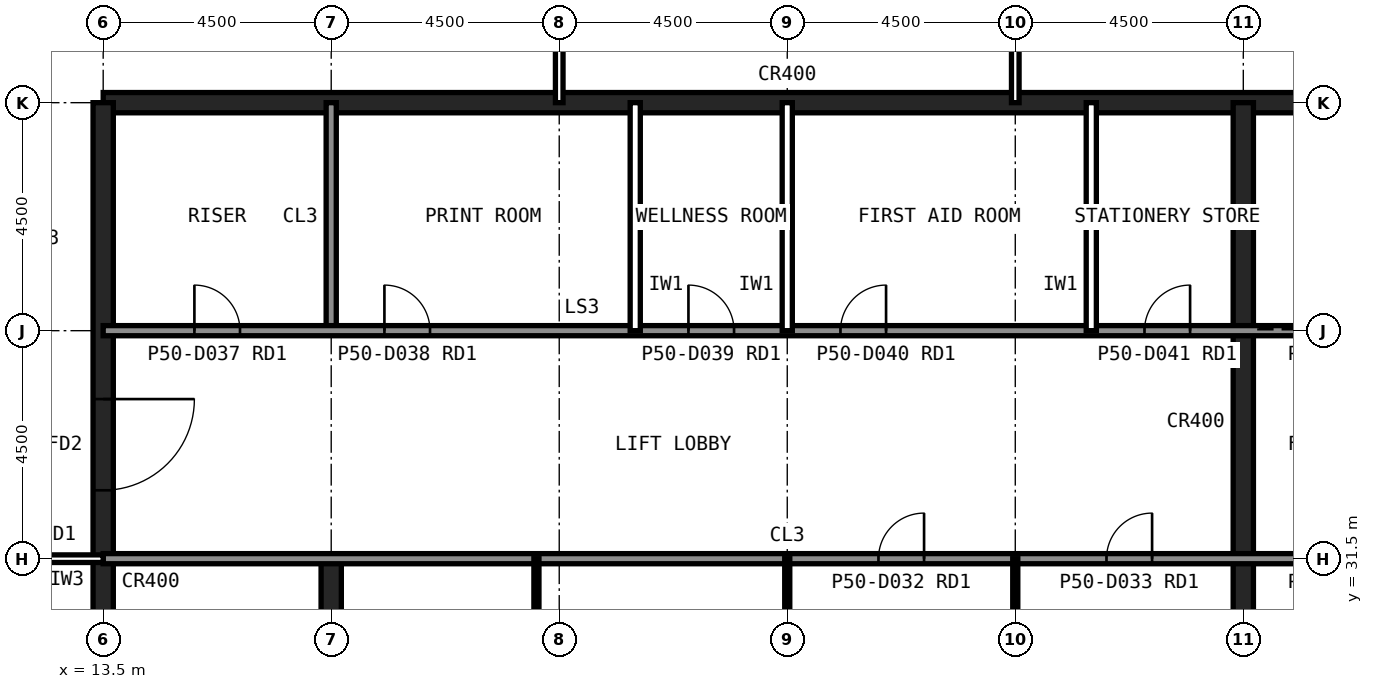
"""IFC4 building model, lengths in metres.
Left out: names, types, materials, properties, quantities, classifications, styles, units other than length and angle.
Written with IfcOpenShell. Run it as: python <this file> out.ifc"""

import sys

from ifc_helpers import new_model, si_unit, direction, frame, frame_2d, origin, place, context, subcontext, project, spatial, rectangle, extrude, element, fill, save


model = new_model("IFC4")
c1 = context("Model", 3, precision=1e-05, world=origin(), true_north=direction((0.0, 1.0)))
c2 = subcontext(c1, "Body", "Model", "MODEL_VIEW")
j1 = project(units=[si_unit("LENGTHUNIT", "METRE"), si_unit("PLANEANGLEUNIT", "RADIAN")], contexts=[c1])
p1 = place(None, origin())
s1 = spatial("IfcSite", under=j1, at=p1, CompositionType="ELEMENT")
p2 = place(p1, origin())
s2 = spatial("IfcBuilding", under=s1, at=p2, CompositionType="ELEMENT")
p3 = place(p2, frame((0.0, 0.0, 214.6)))
s3 = spatial("IfcBuildingStorey", under=s2, at=p3, CompositionType="ELEMENT", Elevation=214.6)
p4 = place(p3, frame((40.5, 40.5, 0.0), z_axis=(0.0, 0.0, 1.0), x_axis=(-1.0, 0.0, 0.0)))
e1 = element("IfcWall", 1, at=p4, inside=s3, PredefinedType="SHEAR", context=c2, shape_type="SweptSolid", body=[
    extrude(rectangle(XDim=27.0, YDim=0.4, at=frame_2d((13.5, 0.0))), origin(), (0.0, 0.0, 1.0), 4.0),
])
p5 = place(p3, frame((13.5, 40.5, 0.0), z_axis=(0.0, 0.0, 1.0), x_axis=(0.0, -1.0, 0.0)))
e2 = element("IfcWall", 2, at=p5, inside=s3, PredefinedType="SHEAR", context=c2, shape_type="SweptSolid", body=[
    extrude(rectangle(XDim=27.0, YDim=0.4, at=frame_2d((13.5, 0.0))), origin(), (0.0, 0.0, 1.0), 4.0),
])
p6 = place(p5, frame((19.65, 0.0, 0.0)))
e3 = element("IfcOpeningElement", 3, at=p6, cuts=e2, PredefinedType="OPENING", context=c2, shape_type="SweptSolid", body=[
    extrude(rectangle(XDim=1.2, YDim=2.1, at=frame_2d((0.6, 1.05))), frame((0.0, 0.21, 0.0), z_axis=(0.0, -1.0, 0.0), x_axis=(1.0, 0.0, 0.0)), (0.0, 0.0, 1.0), 0.42),
])
p7 = place(p5, frame((5.85, 0.0, 0.0)))
e4 = element("IfcOpeningElement", 4, at=p7, cuts=e2, PredefinedType="OPENING", context=c2, shape_type="SweptSolid", body=[
    extrude(rectangle(XDim=1.8, YDim=2.1, at=frame_2d((0.9, 1.05))), frame((0.0, 0.21, 0.0), z_axis=(0.0, -1.0, 0.0), x_axis=(1.0, 0.0, 0.0)), (0.0, 0.0, 1.0), 0.42),
])
p8 = place(p3, frame((18.0, 13.5, 0.0), z_axis=(0.0, 0.0, 1.0), x_axis=(0.0, 1.0, 0.0)))
e5 = element("IfcWall", 5, at=p8, inside=s3, PredefinedType="SHEAR", context=c2, shape_type="SweptSolid", body=[
    extrude(rectangle(XDim=18.0, YDim=0.4, at=frame_2d((9.0, 0.0))), origin(), (0.0, 0.0, 1.0), 4.0),
])
p9 = place(p3, frame((18.0, 36.0, 0.0), z_axis=(0.0, 0.0, 1.0), x_axis=(0.0, 1.0, 0.0)))
e6 = element("IfcWall", 6, at=p9, inside=s3, PredefinedType="SOLIDWALL", context=c2, shape_type="SweptSolid", body=[
    extrude(rectangle(XDim=4.5, YDim=0.2, at=frame_2d((2.25, 0.0))), origin(), (0.0, 0.0, 1.0), 3.84),
])
p10 = place(p3, frame((36.0, 22.5, 0.0), z_axis=(0.0, 0.0, 1.0), x_axis=(0.0, 1.0, 0.0)))
e7 = element("IfcWall", 7, at=p10, inside=s3, PredefinedType="SHEAR", context=c2, shape_type="SweptSolid", body=[
    extrude(rectangle(XDim=18.0, YDim=0.4, at=frame_2d((9.0, 0.0))), origin(), (0.0, 0.0, 1.0), 4.0),
])
p11 = place(p3, frame((13.5, 36.0, 0.0), z_axis=(0.0, 0.0, 1.0), x_axis=(1.0, 0.0, 0.0)))
e8 = element("IfcWall", 8, at=p11, inside=s3, PredefinedType="SOLIDWALL", context=c2, shape_type="SweptSolid", body=[
    extrude(rectangle(XDim=27.0, YDim=0.2, at=frame_2d((13.5, 0.0))), origin(), (0.0, 0.0, 1.0), 3.84),
])
p12 = place(p11, frame((1.8, 0.0, 0.0)))
e9 = element("IfcOpeningElement", 9, at=p12, cuts=e8, PredefinedType="OPENING", context=c2, shape_type="SweptSolid", body=[
    extrude(rectangle(XDim=0.9, YDim=2.1, at=frame_2d((0.45, 1.05))), frame((0.0, 0.11, 0.0), z_axis=(0.0, -1.0, 0.0), x_axis=(1.0, 0.0, 0.0)), (0.0, 0.0, 1.0), 0.22),
])
p13 = place(p11, frame((5.55, 0.0, 0.0)))
e10 = element("IfcOpeningElement", 10, at=p13, cuts=e8, PredefinedType="OPENING", context=c2, shape_type="SweptSolid", body=[
    extrude(rectangle(XDim=0.9, YDim=2.1, at=frame_2d((0.45, 1.05))), frame((0.0, 0.11, 0.0), z_axis=(0.0, -1.0, 0.0), x_axis=(1.0, 0.0, 0.0)), (0.0, 0.0, 1.0), 0.22),
])
p14 = place(p11, frame((11.55, 0.0, 0.0)))
e11 = element("IfcOpeningElement", 11, at=p14, cuts=e8, PredefinedType="OPENING", context=c2, shape_type="SweptSolid", body=[
    extrude(rectangle(XDim=0.9, YDim=2.1, at=frame_2d((0.45, 1.05))), frame((0.0, 0.11, 0.0), z_axis=(0.0, -1.0, 0.0), x_axis=(1.0, 0.0, 0.0)), (0.0, 0.0, 1.0), 0.22),
])
p15 = place(p11, frame((14.55, 0.0, 0.0)))
e12 = element("IfcOpeningElement", 12, at=p15, cuts=e8, PredefinedType="OPENING", context=c2, shape_type="SweptSolid", body=[
    extrude(rectangle(XDim=0.9, YDim=2.1, at=frame_2d((0.45, 1.05))), frame((0.0, 0.11, 0.0), z_axis=(0.0, -1.0, 0.0), x_axis=(1.0, 0.0, 0.0)), (0.0, 0.0, 1.0), 0.22),
])
p16 = place(p11, frame((20.55, 0.0, 0.0)))
e13 = element("IfcOpeningElement", 13, at=p16, cuts=e8, PredefinedType="OPENING", context=c2, shape_type="SweptSolid", body=[
    extrude(rectangle(XDim=0.9, YDim=2.1, at=frame_2d((0.45, 1.05))), frame((0.0, 0.11, 0.0), z_axis=(0.0, -1.0, 0.0), x_axis=(1.0, 0.0, 0.0)), (0.0, 0.0, 1.0), 0.22),
])
p17 = place(p11, frame((24.1, 0.0, 0.0)))
e14 = element("IfcOpeningElement", 14, at=p17, cuts=e8, PredefinedType="OPENING", context=c2, shape_type="SweptSolid", body=[
    extrude(rectangle(XDim=1.3, YDim=2.2, at=frame_2d((0.65, 1.1))), frame((0.0, 0.11, 0.0), z_axis=(0.0, -1.0, 0.0), x_axis=(1.0, 0.0, 0.0)), (0.0, 0.0, 1.0), 0.22),
])
p18 = place(p3, frame((13.5, 31.5, 0.0), z_axis=(0.0, 0.0, 1.0), x_axis=(1.0, 0.0, 0.0)))
e15 = element("IfcWall", 15, at=p18, inside=s3, PredefinedType="SOLIDWALL", context=c2, shape_type="SweptSolid", body=[
    extrude(rectangle(XDim=27.0, YDim=0.2, at=frame_2d((13.5, 0.0))), origin(), (0.0, 0.0, 1.0), 3.84),
])
p19 = place(p18, frame((24.15, 0.0, 0.0)))
e16 = element("IfcOpeningElement", 16, at=p19, cuts=e15, PredefinedType="OPENING", context=c2, shape_type="SweptSolid", body=[
    extrude(rectangle(XDim=1.2, YDim=2.1, at=frame_2d((0.6, 1.05))), frame((0.0, 0.11, 0.0), z_axis=(0.0, -1.0, 0.0), x_axis=(1.0, 0.0, 0.0)), (0.0, 0.0, 1.0), 0.22),
])
p20 = place(p18, frame((15.3, 0.0, 0.0)))
e17 = element("IfcOpeningElement", 17, at=p20, cuts=e15, PredefinedType="OPENING", context=c2, shape_type="SweptSolid", body=[
    extrude(rectangle(XDim=0.9, YDim=2.1, at=frame_2d((0.45, 1.05))), frame((0.0, 0.11, 0.0), z_axis=(0.0, -1.0, 0.0), x_axis=(1.0, 0.0, 0.0)), (0.0, 0.0, 1.0), 0.22),
])
p21 = place(p18, frame((19.8, 0.0, 0.0)))
e18 = element("IfcOpeningElement", 18, at=p21, cuts=e15, PredefinedType="OPENING", context=c2, shape_type="SweptSolid", body=[
    extrude(rectangle(XDim=0.9, YDim=2.1, at=frame_2d((0.45, 1.05))), frame((0.0, 0.11, 0.0), z_axis=(0.0, -1.0, 0.0), x_axis=(1.0, 0.0, 0.0)), (0.0, 0.0, 1.0), 0.22),
])
for number, where, z_axis, x_axis in (
    (19, (24.0, 36.0, 0.0), (0.0, 0.0, 1.0), (0.0, 1.0, 0.0)),
    (20, (27.0, 36.0, 0.0), (0.0, 0.0, 1.0), (0.0, 1.0, 0.0)),
    (21, (33.0, 36.0, 0.0), (0.0, 0.0, 1.0), (0.0, 1.0, 0.0)),
):
    element("IfcWall", number, at=place(p3, frame(where, z_axis=z_axis, x_axis=x_axis)), inside=s3, PredefinedType="PARTITIONING", context=c2, shape_type="SweptSolid", body=[
        extrude(rectangle(XDim=4.5, YDim=0.2, at=frame_2d((2.25, 0.0))), origin(), (0.0, 0.0, 1.0), 3.84),
    ])
for number, where, z_axis, x_axis in (
    (22, (22.05, 22.5, 0.0), (0.0, 0.0, 1.0), (0.0, 1.0, 0.0)),
    (23, (27.0, 22.5, 0.0), (0.0, 0.0, 1.0), (0.0, 1.0, 0.0)),
    (24, (31.5, 22.5, 0.0), (0.0, 0.0, 1.0), (0.0, 1.0, 0.0)),
):
    element("IfcWall", number, at=place(p3, frame(where, z_axis=z_axis, x_axis=x_axis)), inside=s3, PredefinedType="PLUMBINGWALL", context=c2, shape_type="SweptSolid", body=[
        extrude(rectangle(XDim=9.0, YDim=0.1, at=frame_2d((4.5, 0.0))), origin(), (0.0, 0.0, 1.0), 3.84),
    ])
p22 = place(p3, frame((31.5, 40.5, 0.0), z_axis=(0.0, 0.0, 1.0), x_axis=(0.0, 1.0, 0.0)))
e25 = element("IfcWall", 25, at=p22, inside=s3, PredefinedType="PARTITIONING", context=c2, shape_type="SweptSolid", body=[
    extrude(rectangle(XDim=4.5, YDim=0.15, at=frame_2d((2.25, 0.0))), origin(), (0.0, 0.0, 1.0), 2.989),
])
p23 = place(p3, frame((22.5, 45.0, 0.0), z_axis=(0.0, 0.0, 1.0), x_axis=(0.0, -1.0, 0.0)))
e26 = element("IfcWall", 26, at=p23, inside=s3, PredefinedType="PARTITIONING", context=c2, shape_type="SweptSolid", body=[
    extrude(rectangle(XDim=4.5, YDim=0.15, at=frame_2d((2.25, 0.0))), origin(), (0.0, 0.0, 1.0), 2.989),
])
p24 = place(p23, frame((1.75, 0.0, 0.0)))
e27 = element("IfcOpeningElement", 27, at=p24, cuts=e26, PredefinedType="OPENING", context=c2, shape_type="SweptSolid", body=[
    extrude(rectangle(XDim=1.0, YDim=2.1, at=frame_2d((0.5, 1.05))), frame((0.0, 0.085, 0.0), z_axis=(0.0, -1.0, 0.0), x_axis=(1.0, 0.0, 0.0)), (0.0, 0.0, 1.0), 0.17),
])
p25 = place(p3, frame((13.5, 31.5, 0.0), z_axis=(0.0, 0.0, 1.0), x_axis=(-1.0, 0.0, 0.0)))
e28 = element("IfcWall", 28, at=p25, inside=s3, PredefinedType="PARTITIONING", context=c2, shape_type="SweptSolid", body=[
    extrude(rectangle(XDim=3.6, YDim=0.15, at=frame_2d((1.8, 0.0))), origin(), (0.0, 0.0, 1.0), 2.989),
])
p26 = place(p25, frame((1.3, 0.0, 0.0)))
e29 = element("IfcOpeningElement", 29, at=p26, cuts=e28, PredefinedType="OPENING", context=c2, shape_type="SweptSolid", body=[
    extrude(rectangle(XDim=1.0, YDim=2.1, at=frame_2d((0.5, 1.05))), frame((0.0, 0.085, 0.0), z_axis=(0.0, -1.0, 0.0), x_axis=(1.0, 0.0, 0.0)), (0.0, 0.0, 1.0), 0.17),
])
p27 = place(p7, origin())
e30 = element("IfcDoor", 30, at=p27, inside=s3, OperationType="SINGLE_SWING_LEFT", PredefinedType="DOOR", context=c2, shape_type="SweptSolid", body=[
    extrude(rectangle(XDim=1.8, YDim=2.1, at=frame_2d((0.9, 1.05))), frame((0.0, 0.025, 0.0), z_axis=(0.0, -1.0, 0.0), x_axis=(1.0, 0.0, 0.0)), (0.0, 0.0, 1.0), 0.05),
])
fill(e4, e30)
p28 = place(p20, origin())
e31 = element("IfcDoor", 31, at=p28, inside=s3, OperationType="SINGLE_SWING_RIGHT", PredefinedType="DOOR", context=c2, shape_type="SweptSolid", body=[
    extrude(rectangle(XDim=0.9, YDim=2.1, at=frame_2d((0.45, 1.05))), frame((0.0, 0.025, 0.0), z_axis=(0.0, -1.0, 0.0), x_axis=(1.0, 0.0, 0.0)), (0.0, 0.0, 1.0), 0.05),
])
fill(e17, e31)
p29 = place(p21, origin())
e32 = element("IfcDoor", 32, at=p29, inside=s3, OperationType="SINGLE_SWING_RIGHT", PredefinedType="DOOR", context=c2, shape_type="SweptSolid", body=[
    extrude(rectangle(XDim=0.9, YDim=2.1, at=frame_2d((0.45, 1.05))), frame((0.0, 0.025, 0.0), z_axis=(0.0, -1.0, 0.0), x_axis=(1.0, 0.0, 0.0)), (0.0, 0.0, 1.0), 0.05),
])
fill(e18, e32)
p30 = place(p12, origin())
e33 = element("IfcDoor", 33, at=p30, inside=s3, OperationType="SINGLE_SWING_LEFT", PredefinedType="DOOR", context=c2, shape_type="SweptSolid", body=[
    extrude(rectangle(XDim=0.9, YDim=2.1, at=frame_2d((0.45, 1.05))), frame((0.0, 0.025, 0.0), z_axis=(0.0, -1.0, 0.0), x_axis=(1.0, 0.0, 0.0)), (0.0, 0.0, 1.0), 0.05),
])
fill(e9, e33)
p31 = place(p13, origin())
e34 = element("IfcDoor", 34, at=p31, inside=s3, OperationType="SINGLE_SWING_LEFT", PredefinedType="DOOR", context=c2, shape_type="SweptSolid", body=[
    extrude(rectangle(XDim=0.9, YDim=2.1, at=frame_2d((0.45, 1.05))), frame((0.0, 0.025, 0.0), z_axis=(0.0, -1.0, 0.0), x_axis=(1.0, 0.0, 0.0)), (0.0, 0.0, 1.0), 0.05),
])
fill(e10, e34)
p32 = place(p14, origin())
e35 = element("IfcDoor", 35, at=p32, inside=s3, OperationType="SINGLE_SWING_LEFT", PredefinedType="DOOR", context=c2, shape_type="SweptSolid", body=[
    extrude(rectangle(XDim=0.9, YDim=2.1, at=frame_2d((0.45, 1.05))), frame((0.0, 0.025, 0.0), z_axis=(0.0, -1.0, 0.0), x_axis=(1.0, 0.0, 0.0)), (0.0, 0.0, 1.0), 0.05),
])
fill(e11, e35)
p33 = place(p15, origin())
e36 = element("IfcDoor", 36, at=p33, inside=s3, OperationType="SINGLE_SWING_RIGHT", PredefinedType="DOOR", context=c2, shape_type="SweptSolid", body=[
    extrude(rectangle(XDim=0.9, YDim=2.1, at=frame_2d((0.45, 1.05))), frame((0.0, 0.025, 0.0), z_axis=(0.0, -1.0, 0.0), x_axis=(1.0, 0.0, 0.0)), (0.0, 0.0, 1.0), 0.05),
])
fill(e12, e36)
p34 = place(p16, origin())
e37 = element("IfcDoor", 37, at=p34, inside=s3, OperationType="SINGLE_SWING_RIGHT", PredefinedType="DOOR", context=c2, shape_type="SweptSolid", body=[
    extrude(rectangle(XDim=0.9, YDim=2.1, at=frame_2d((0.45, 1.05))), frame((0.0, 0.025, 0.0), z_axis=(0.0, -1.0, 0.0), x_axis=(1.0, 0.0, 0.0)), (0.0, 0.0, 1.0), 0.05),
])
fill(e13, e37)
save(model, sys.argv[1])
